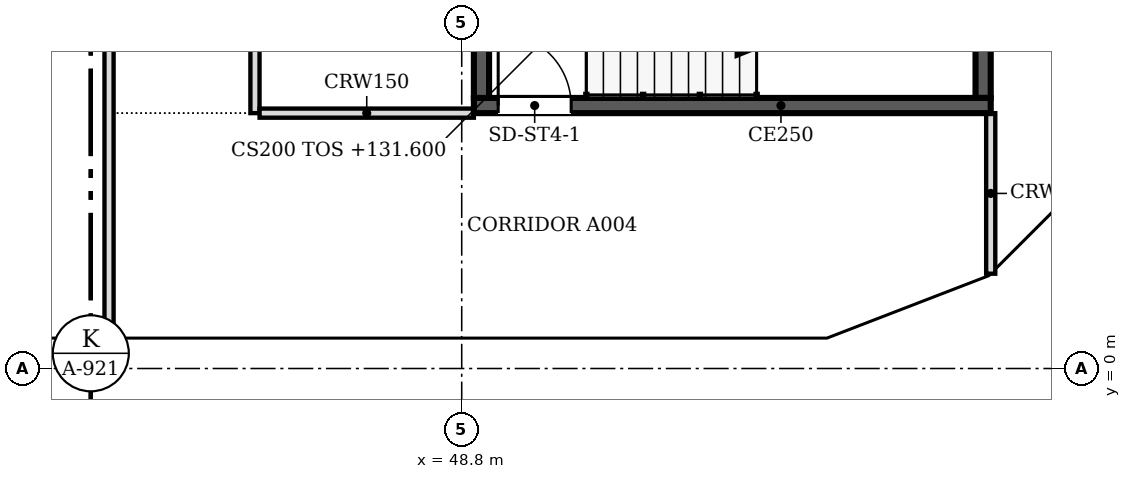
"""IFC4 building model, lengths in metres.
Left out: names, types, materials, properties, quantities, classifications, styles, units other than length and angle.
Written with IfcOpenShell. Run it as: python <this file> out.ifc"""

import sys

from ifc_helpers import new_model, si_unit, direction, frame, frame_2d, origin, place, context, subcontext, project, spatial, polyline, rectangle, outline, extrude, faceted_brep, source, transform, mapped, element, fill, save


model = new_model("IFC4")
c1 = context("Model", 3, precision=1e-05, world=origin(), true_north=direction((0.0, 1.0)))
c2 = subcontext(c1, "Body", "Model", "MODEL_VIEW")
j1 = project(units=[si_unit("LENGTHUNIT", "METRE"), si_unit("PLANEANGLEUNIT", "RADIAN")], contexts=[c1])
p1 = place(None, origin())
s1 = spatial("IfcSite", under=j1, at=p1, CompositionType="ELEMENT")
p2 = place(p1, origin())
s2 = spatial("IfcBuilding", under=s1, at=p2, CompositionType="ELEMENT")
p3 = place(p2, frame((0.0, 0.0, 131.6)))
s3 = spatial("IfcBuildingStorey", under=s2, at=p3, CompositionType="ELEMENT", Elevation=131.6)
m1 = source(origin(), c2, "Body", "Brep", [
    faceted_brep([(3.05, -0.25, 0.0), (6.1, -0.25, 3.8), (6.1, -0.25, 3.8), (3.05, -0.25, 7.6), (0.0, -0.25, 3.8), (0.0, 0.25, 3.8), (3.05, 0.25, 7.6), (6.1, 0.25, 3.8), (6.1, 0.25, 3.8), (3.05, 0.25, 0.0)], [[[0, 1, 2, 3, 4]], [[5, 6, 7, 8, 9]], [[9, 8, 1, 0]], [[7, 6, 3, 2]], [[6, 5, 4, 3]], [[5, 9, 0, 4]], [[1, 8, 7, 2]]]),
])
p4 = place(p3, frame((36.6, 0.25, -3.8), z_axis=(0.0, 0.0, 1.0), x_axis=(1.0, 0.0, 0.0)))
e1 = element("IfcWall", 1, at=p4, inside=s3, PredefinedType="SOLIDWALL", context=c2, shape_type="MappedRepresentation", body=[
    mapped(m1, transform((0.0, 0.0, 0.0), scale=1.0)),
])
m2 = source(origin(), c2, "Body", "SweptSolid", [
    extrude(outline(polyline([(3.05, 0.399), (5.78, 3.8), (3.05, 7.2), (0.321, 3.8), (3.05, 0.399)])), frame((0.0, 0.26, 0.0), z_axis=(0.0, -1.0, 0.0), x_axis=(1.0, 0.0, 0.0)), (0.0, 0.0, 1.0), 0.52),
])
p5 = place(p4, origin())
e2 = element("IfcOpeningElement", 2, at=p5, cuts=e1, PredefinedType="OPENING", context=c2, shape_type="MappedRepresentation", body=[
    mapped(m2, transform((0.0, 0.0, 0.0), scale=1.0)),
])
m3 = source(origin(), c2, "Body", "SweptSolid", [
    extrude(outline(polyline([(3.05, 0.0), (6.1, 3.8), (3.05, 7.6), (0.0, 3.8), (3.05, 0.0)])), frame((0.0, 0.25, 0.0), z_axis=(0.0, -1.0, 0.0), x_axis=(1.0, 0.0, 0.0)), (0.0, 0.0, 1.0), 0.5),
])
p6 = place(p3, frame((42.7, 0.25, -3.8), z_axis=(0.0, 0.0, 1.0), x_axis=(1.0, 0.0, 0.0)))
e3 = element("IfcWall", 3, at=p6, inside=s3, PredefinedType="SOLIDWALL", context=c2, shape_type="MappedRepresentation", body=[
    mapped(m3, transform((0.0, 0.0, 0.0), scale=1.0)),
])
p7 = place(p6, origin())
e4 = element("IfcOpeningElement", 4, at=p7, cuts=e3, PredefinedType="OPENING", context=c2, shape_type="MappedRepresentation", body=[
    mapped(m2, transform((0.0, 0.0, 0.0), scale=1.0)),
])
m4 = source(origin(), c2, "Body", "Brep", [
    faceted_brep([(3.05, -0.25, 0.0), (6.053, -0.25, 3.8), (3.05, -0.25, 7.6), (0.0, -0.25, 3.8), (0.0, 0.25, 3.8), (3.05, 0.25, 7.6), (6.007, 0.25, 3.859), (6.007, 0.25, 3.741), (3.05, 0.25, 0.0), (6.053, 0.0, 3.8)], [[[0, 1, 2, 3]], [[4, 5, 6, 7, 8]], [[8, 7, 9, 1, 0]], [[6, 5, 2, 1, 9]], [[5, 4, 3, 2]], [[4, 8, 0, 3]], [[7, 6, 9]]]),
])
p8 = place(p3, frame((48.8, 0.25, -3.8), z_axis=(0.0, 0.0, 1.0), x_axis=(1.0, 0.0, 0.0)))
e5 = element("IfcWall", 5, at=p8, inside=s3, PredefinedType="SOLIDWALL", context=c2, shape_type="MappedRepresentation", body=[
    mapped(m4, transform((0.0, 0.0, 0.0), scale=1.0)),
])
m5 = source(origin(), c2, "Body", "SweptSolid", [
    extrude(outline(polyline([(3.049, 0.401), (5.735, 3.8), (3.049, 7.199), (0.321, 3.8), (3.049, 0.401)])), frame((0.0, 0.26, 0.0), z_axis=(0.0, -1.0, 0.0), x_axis=(1.0, 0.0, 0.0)), (0.0, 0.0, 1.0), 0.52),
])
p9 = place(p8, origin())
e6 = element("IfcOpeningElement", 6, at=p9, cuts=e5, PredefinedType="OPENING", context=c2, shape_type="MappedRepresentation", body=[
    mapped(m5, transform((0.0, 0.0, 0.0), scale=1.0)),
])
m6 = source(origin(), c2, "Body", "Brep", [
    faceted_brep([(2.95, -0.25, 0.0), (3.003, -0.25, 0.068), (3.003, -0.25, 7.531), (2.95, -0.25, 7.6), (0.0, -0.25, 3.8), (0.047, 0.25, 3.86), (2.898, 0.25, 7.532), (2.898, 0.25, 0.068), (0.047, 0.25, 3.74), (2.95, 0.0, 0.0), (2.95, 0.0, 7.6), (0.0, 0.0, 3.8)], [[[0, 1, 2, 3, 4]], [[5, 6, 7, 8]], [[1, 0, 9]], [[10, 3, 2]], [[6, 5, 11, 4, 3, 10]], [[8, 7, 9, 0, 4, 11]], [[8, 11, 5]], [[1, 9, 7, 6, 10, 2]]]),
])
p10 = place(p3, frame((54.854, 0.25, -3.8), z_axis=(0.0, 0.0, 1.0), x_axis=(0.932970071518, 0.359953949349, 0.0)))
e7 = element("IfcWall", 7, at=p10, inside=s3, PredefinedType="SOLIDWALL", context=c2, shape_type="MappedRepresentation", body=[
    mapped(m6, transform((0.0, 0.0, 0.0), scale=1.0)),
])
m7 = source(origin(), c2, "Body", "SweptSolid", [
    extrude(outline(polyline([(2.75, 6.935), (0.316, 3.8), (2.75, 0.665), (2.75, 6.935)])), frame((0.0, 0.26, 0.0), z_axis=(0.0, -1.0, 0.0), x_axis=(1.0, 0.0, 0.0)), (0.0, 0.0, 1.0), 0.52),
])
p11 = place(p10, origin())
e8 = element("IfcOpeningElement", 8, at=p11, cuts=e7, PredefinedType="OPENING", context=c2, shape_type="MappedRepresentation", body=[
    mapped(m7, transform((0.0, 0.0, 0.0), scale=1.0)),
])
m8 = source(origin(), c2, "Body", "Brep", [
    faceted_brep([(0.053, -0.25, 0.0), (2.997, -0.25, 3.8), (0.053, -0.25, 7.6), (0.0, -0.25, 7.532), (0.0, -0.25, 0.068), (0.106, 0.25, 7.531), (2.944, 0.25, 3.868), (2.944, 0.25, 3.732), (0.106, 0.25, 0.068), (2.997, 0.0, 3.8), (0.053, 0.0, 0.0), (0.053, 0.0, 7.6)], [[[0, 1, 2, 3, 4]], [[5, 6, 7, 8]], [[8, 7, 9, 1, 0, 10]], [[6, 5, 11, 2, 1, 9]], [[3, 2, 11]], [[10, 0, 4]], [[8, 10, 4, 3, 11, 5]], [[7, 6, 9]]]),
])
p12 = place(p3, frame((57.569, 1.274, -3.8), z_axis=(0.0, 0.0, 1.0), x_axis=(0.707066050402, 0.707147509625, 0.0)))
e9 = element("IfcWall", 9, at=p12, inside=s3, PredefinedType="SOLIDWALL", context=c2, shape_type="MappedRepresentation", body=[
    mapped(m8, transform((0.0, 0.0, 0.0), scale=1.0)),
])
m9 = source(origin(), c2, "Body", "SweptSolid", [
    extrude(outline(polyline([(0.253, 0.666), (2.681, 3.8), (0.253, 6.934), (0.253, 0.666)])), frame((0.0, 0.26, 0.0), z_axis=(0.0, -1.0, 0.0), x_axis=(1.0, 0.0, 0.0)), (0.0, 0.0, 1.0), 0.52),
])
p13 = place(p12, origin())
e10 = element("IfcOpeningElement", 10, at=p13, cuts=e9, PredefinedType="OPENING", context=c2, shape_type="MappedRepresentation", body=[
    mapped(m9, transform((0.0, 0.0, 0.0), scale=1.0)),
])
p14 = place(p2, frame((0.0, 0.0, 135.4)))
s4 = spatial("IfcBuildingStorey", under=s2, at=p14, CompositionType="ELEMENT", Elevation=135.4)
m10 = source(origin(), c2, "Body", "SweptSolid", [
    extrude(outline(polyline([(3.05, 0.0), (6.1, 3.8), (3.05, 7.6), (0.0, 3.8), (3.05, 0.0)])), frame((0.0, 0.25, 0.0), z_axis=(0.0, -1.0, 0.0), x_axis=(1.0, 0.0, 0.0)), (0.0, 0.0, 1.0), 0.5),
])
p15 = place(p14, frame((39.65, 0.25, -3.8), z_axis=(0.0, 0.0, 1.0), x_axis=(1.0, 0.0, 0.0)))
e11 = element("IfcWall", 11, at=p15, inside=s4, PredefinedType="SOLIDWALL", context=c2, shape_type="MappedRepresentation", body=[
    mapped(m10, transform((0.0, 0.0, 0.0), scale=1.0)),
])
m11 = source(origin(), c2, "Body", "SweptSolid", [
    extrude(outline(polyline([(3.05, 0.399), (5.78, 3.8), (3.05, 7.2), (0.321, 3.8), (3.05, 0.399)])), frame((0.0, 0.26, 0.0), z_axis=(0.0, -1.0, 0.0), x_axis=(1.0, 0.0, 0.0)), (0.0, 0.0, 1.0), 0.52),
])
p16 = place(p15, origin())
e12 = element("IfcOpeningElement", 12, at=p16, cuts=e11, PredefinedType="OPENING", context=c2, shape_type="MappedRepresentation", body=[
    mapped(m11, transform((0.0, 0.0, 0.0), scale=1.0)),
])
p17 = place(p14, frame((45.75, 0.25, -3.8), z_axis=(0.0, 0.0, 1.0), x_axis=(1.0, 0.0, 0.0)))
e13 = element("IfcWall", 13, at=p17, inside=s4, PredefinedType="SOLIDWALL", context=c2, shape_type="MappedRepresentation", body=[
    mapped(m10, transform((0.0, 0.0, 0.0), scale=1.0)),
])
p18 = place(p17, origin())
e14 = element("IfcOpeningElement", 14, at=p18, cuts=e13, PredefinedType="OPENING", context=c2, shape_type="MappedRepresentation", body=[
    mapped(m11, transform((0.0, 0.0, 0.0), scale=1.0)),
])
m12 = source(origin(), c2, "Body", "Brep", [
    faceted_brep([(3.003, -0.25, 0.0), (3.05, -0.25, 0.06), (3.05, -0.25, 7.54), (3.003, -0.25, 7.6), (0.0, -0.25, 3.8), (0.0, 0.25, 3.8), (2.957, 0.25, 7.541), (2.957, 0.25, 0.059), (3.003, 0.0, 0.0), (3.003, 0.0, 7.6)], [[[0, 1, 2, 3, 4]], [[5, 6, 7]], [[1, 0, 8]], [[9, 3, 2]], [[6, 5, 4, 3, 9]], [[5, 7, 8, 0, 4]], [[1, 8, 7, 6, 9, 2]]]),
])
p19 = place(p14, frame((51.85, 0.25, -3.8), z_axis=(0.0, 0.0, 1.0), x_axis=(1.0, 0.0, 0.0)))
e15 = element("IfcWall", 15, at=p19, inside=s4, PredefinedType="SOLIDWALL", context=c2, shape_type="MappedRepresentation", body=[
    mapped(m12, transform((0.0, 0.0, 0.0), scale=1.0)),
])
m13 = source(origin(), c2, "Body", "SweptSolid", [
    extrude(outline(polyline([(2.803, 6.944), (0.319, 3.8), (2.803, 0.656), (2.803, 6.944)])), frame((0.0, 0.26, 0.0), z_axis=(0.0, -1.0, 0.0), x_axis=(1.0, 0.0, 0.0)), (0.0, 0.0, 1.0), 0.52),
])
p20 = place(p19, origin())
e16 = element("IfcOpeningElement", 16, at=p20, cuts=e15, PredefinedType="OPENING", context=c2, shape_type="MappedRepresentation", body=[
    mapped(m13, transform((0.0, 0.0, 0.0), scale=1.0)),
])
m14 = source(origin(), c2, "Body", "Brep", [
    faceted_brep([(0.047, -0.25, 0.0), (2.997, -0.25, 3.8), (0.047, -0.25, 7.6), (0.0, -0.25, 7.541), (0.0, -0.25, 0.059), (0.093, 0.25, 7.54), (2.944, 0.25, 3.868), (2.944, 0.25, 3.732), (0.093, 0.25, 0.06), (2.997, 0.0, 3.8), (0.047, 0.0, 0.0), (0.047, 0.0, 7.6)], [[[0, 1, 2, 3, 4]], [[5, 6, 7, 8]], [[8, 7, 9, 1, 0, 10]], [[6, 5, 11, 2, 1, 9]], [[3, 2, 11]], [[10, 0, 4]], [[8, 10, 4, 3, 11, 5]], [[9, 7, 6]]]),
])
p21 = place(p14, frame((54.81, 0.233, -3.8), z_axis=(0.0, 0.0, 1.0), x_axis=(0.932990326376, 0.359901446078, 0.0)))
e17 = element("IfcWall", 17, at=p21, inside=s4, PredefinedType="SOLIDWALL", context=c2, shape_type="MappedRepresentation", body=[
    mapped(m14, transform((0.0, 0.0, 0.0), scale=1.0)),
])
m15 = source(origin(), c2, "Body", "SweptSolid", [
    extrude(outline(polyline([(0.247, 0.665), (2.681, 3.8), (0.247, 6.935), (0.247, 0.665)])), frame((0.0, 0.26, 0.0), z_axis=(0.0, -1.0, 0.0), x_axis=(1.0, 0.0, 0.0)), (0.0, 0.0, 1.0), 0.52),
])
p22 = place(p21, origin())
e18 = element("IfcOpeningElement", 18, at=p22, cuts=e17, PredefinedType="OPENING", context=c2, shape_type="MappedRepresentation", body=[
    mapped(m15, transform((0.0, 0.0, 0.0), scale=1.0)),
])
m16 = source(origin(), c2, "Body", "Brep", [
    faceted_brep([(2.944, -0.25, 0.0), (2.997, -0.25, 0.068), (2.997, -0.25, 7.532), (2.944, -0.25, 7.6), (0.0, -0.25, 3.8), (0.053, 0.25, 3.868), (2.891, 0.25, 7.532), (2.891, 0.25, 0.068), (0.053, 0.25, 3.731), (2.944, 0.0, 0.0), (2.944, 0.0, 7.6), (0.0, 0.0, 3.8)], [[[0, 1, 2, 3, 4]], [[5, 6, 7, 8]], [[1, 0, 9]], [[10, 3, 2]], [[6, 5, 11, 4, 3, 10]], [[8, 7, 9, 0, 4, 11]], [[8, 11, 5]], [[1, 9, 7, 6, 10, 2]]]),
])
p23 = place(p14, frame((57.606, 1.312, -3.8), z_axis=(0.0, 0.0, 1.0), x_axis=(0.707147509625, 0.707066050402, 0.0)))
e19 = element("IfcWall", 19, at=p23, inside=s4, PredefinedType="SOLIDWALL", context=c2, shape_type="MappedRepresentation", body=[
    mapped(m16, transform((0.0, 0.0, 0.0), scale=1.0)),
])
m17 = source(origin(), c2, "Body", "SweptSolid", [
    extrude(outline(polyline([(2.744, 6.934), (0.316, 3.8), (2.744, 0.666), (2.744, 6.934)])), frame((0.0, 0.26, 0.0), z_axis=(0.0, -1.0, 0.0), x_axis=(1.0, 0.0, 0.0)), (0.0, 0.0, 1.0), 0.52),
])
p24 = place(p23, origin())
e20 = element("IfcOpeningElement", 20, at=p24, cuts=e19, PredefinedType="OPENING", context=c2, shape_type="MappedRepresentation", body=[
    mapped(m17, transform((0.0, 0.0, 0.0), scale=1.0)),
])
p25 = place(p3, frame((57.5, 4.325, 0.0), z_axis=(0.0, 0.0, 1.0), x_axis=(-1.0, 0.0, 0.0)))
e21 = element("IfcWall", 21, at=p25, inside=s3, PredefinedType="SOLIDWALL", context=c2, shape_type="SweptSolid", body=[
    extrude(rectangle(XDim=8.5, YDim=0.25, at=frame_2d((4.25, 0.0))), origin(), (0.0, 0.0, 1.0), 3.8),
])
m18 = source(origin(), c2, "Body", "SweptSolid", [
    extrude(rectangle(XDim=1.2, YDim=2.1, at=frame_2d((0.6, 1.05))), frame((0.0, 0.135, 0.0), z_axis=(0.0, -1.0, 0.0), x_axis=(1.0, 0.0, 0.0)), (0.0, 0.0, 1.0), 0.27),
])
p26 = place(p25, frame((6.9, 0.0, 0.0)))
e22 = element("IfcOpeningElement", 22, at=p26, cuts=e21, PredefinedType="OPENING", context=c2, shape_type="MappedRepresentation", body=[
    mapped(m18, transform((0.0, 0.0, 0.0), scale=1.0)),
])
for number, where, z_axis, x_axis in (
    (23, (49.125, 4.45, 0.0), (0.0, 0.0, 1.0), (0.0, 1.0, 0.0)),
    (24, (57.375, 7.85, 0.0), (0.0, 0.0, 1.0), (0.0, -1.0, 0.0)),
):
    element("IfcWall", number, at=place(p3, frame(where, z_axis=z_axis, x_axis=x_axis)), inside=s3, PredefinedType="SOLIDWALL", context=c2, shape_type="SweptSolid", body=[
        extrude(rectangle(XDim=3.4, YDim=0.25, at=frame_2d((1.7, 0.0))), origin(), (0.0, 0.0, 1.0), 3.8),
    ])
p27 = place(p3, frame((43.0, 0.5, 0.0), z_axis=(0.0, 0.0, 1.0), x_axis=(0.0, 1.0, 0.0)))
e25 = element("IfcWall", 25, at=p27, inside=s3, PredefinedType="PARTITIONING", context=c2, shape_type="SweptSolid", body=[
    extrude(rectangle(XDim=21.424, YDim=0.15, at=frame_2d((10.712, 0.0))), origin(), (0.0, 0.0, 1.0), 3.067),
])
m19 = source(origin(), c2, "Body", "SweptSolid", [
    extrude(rectangle(XDim=1.0, YDim=2.1, at=frame_2d((0.5, 1.05))), frame((0.0, 0.085, 0.0), z_axis=(0.0, -1.0, 0.0), x_axis=(1.0, 0.0, 0.0)), (0.0, 0.0, 1.0), 0.17),
])
p28 = place(p27, frame((16.601, 0.0, 0.0)))
e26 = element("IfcOpeningElement", 26, at=p28, cuts=e25, PredefinedType="OPENING", context=c2, shape_type="MappedRepresentation", body=[
    mapped(m19, transform((0.0, 0.0, 0.0), scale=1.0)),
])
p29 = place(p27, frame((7.7, 0.0, 0.0)))
e27 = element("IfcOpeningElement", 27, at=p29, cuts=e25, PredefinedType="OPENING", context=c2, shape_type="MappedRepresentation", body=[
    mapped(m19, transform((0.0, 0.0, 0.0), scale=1.0)),
])
p30 = place(p3, frame((57.5, 1.559, 0.0), z_axis=(0.0, 0.0, 1.0), x_axis=(0.0, 1.0, 0.0)))
e28 = element("IfcWall", 28, at=p30, inside=s3, PredefinedType="PARTITIONING", context=c2, shape_type="SweptSolid", body=[
    extrude(rectangle(XDim=2.641, YDim=0.15, at=frame_2d((1.32, 0.0))), origin(), (0.0, 0.0, 1.0), 3.067),
])
p31 = place(p3, frame((45.4, 22.0, 0.0), z_axis=(0.0, 0.0, 1.0), x_axis=(0.0, -1.0, 0.0)))
e29 = element("IfcWall", 29, at=p31, inside=s3, PredefinedType="PARTITIONING", context=c2, shape_type="SweptSolid", body=[
    extrude(rectangle(XDim=17.8, YDim=0.15, at=frame_2d((8.9, 0.0))), origin(), (0.0, 0.0, 1.0), 3.067),
])
p32 = place(p31, frame((3.499, 0.0, 0.0)))
e30 = element("IfcOpeningElement", 30, at=p32, cuts=e29, PredefinedType="OPENING", context=c2, shape_type="MappedRepresentation", body=[
    mapped(m19, transform((0.0, 0.0, 0.0), scale=1.0)),
])
m20 = source(origin(), c2, "Body", "SweptSolid", [
    extrude(rectangle(XDim=0.9, YDim=2.1, at=frame_2d((0.45, 1.05))), frame((0.0, 0.085, 0.0), z_axis=(0.0, -1.0, 0.0), x_axis=(1.0, 0.0, 0.0)), (0.0, 0.0, 1.0), 0.17),
])
p33 = place(p31, frame((12.4, 0.0, 0.0)))
e31 = element("IfcOpeningElement", 31, at=p33, cuts=e29, PredefinedType="OPENING", context=c2, shape_type="MappedRepresentation", body=[
    mapped(m20, transform((0.0, 0.0, 0.0), scale=1.0)),
])
p34 = place(p3, frame((45.476, 4.2, 0.0), z_axis=(0.0, 0.0, 1.0), x_axis=(1.0, 0.0, 0.0)))
e32 = element("IfcWall", 32, at=p34, inside=s3, PredefinedType="PARTITIONING", context=c2, shape_type="SweptSolid", body=[
    extrude(rectangle(XDim=3.524, YDim=0.15, at=frame_2d((1.762, 0.0))), origin(), (0.0, 0.0, 1.0), 3.067),
])
m21 = source(origin(), c2, "Body", "SweptSolid", [
    extrude(rectangle(XDim=1.2, YDim=2.1, at=frame_2d((0.6, 1.05))), frame((0.0, 0.025, 0.0), z_axis=(0.0, -1.0, 0.0), x_axis=(1.0, 0.0, 0.0)), (0.0, 0.0, 1.0), 0.05),
])
p35 = place(p26, origin())
e33 = element("IfcDoor", 33, at=p35, inside=s3, OperationType="SINGLE_SWING_RIGHT", PredefinedType="DOOR", context=c2, shape_type="MappedRepresentation", body=[
    mapped(m21, transform((0.0, 0.0, 0.0), scale=1.0)),
])
fill(e22, e33)
save(model, sys.argv[1])
